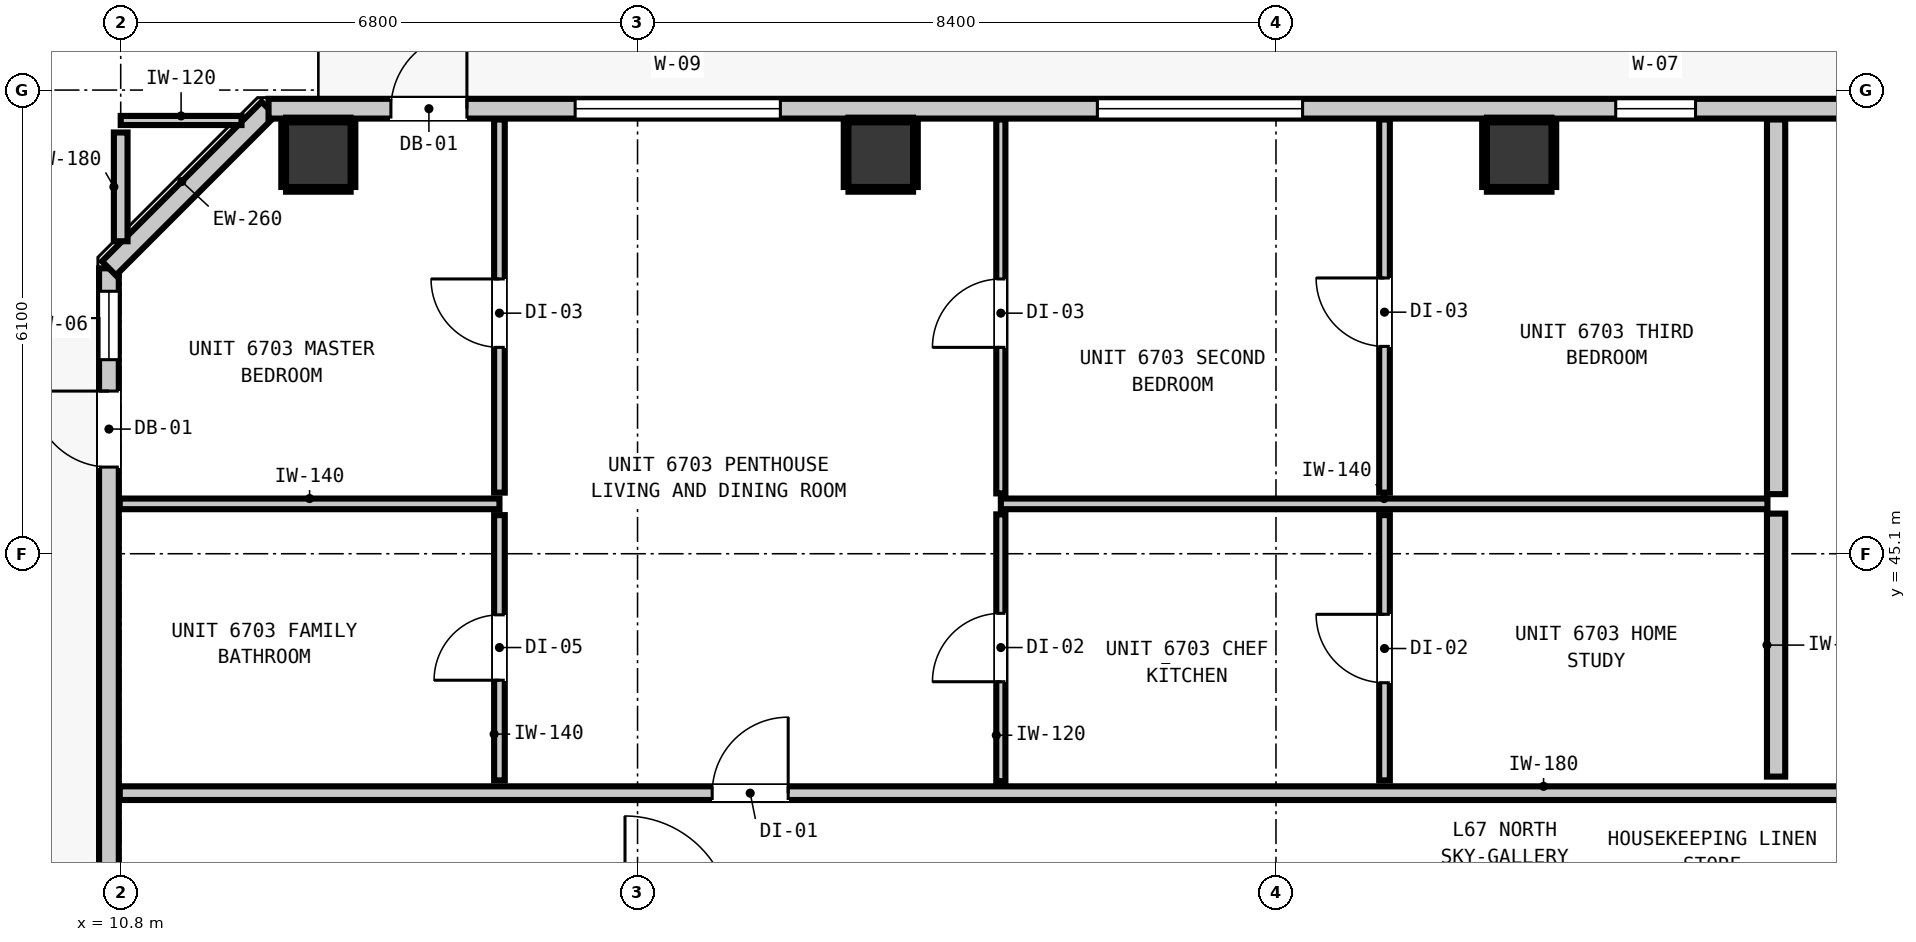
"""IFC4 building model, lengths in metres.
Left out: names, types, materials, properties, quantities, classifications, styles, units other than length and angle.
Written with IfcOpenShell. Run it as: python <this file> out.ifc"""

import sys

from ifc_helpers import new_model, si_unit, direction, frame, frame_2d, origin, origin_2d, place, context, subcontext, project, spatial, rectangle, extrude, element, fill, save


model = new_model("IFC4")
c1 = context("Model", 3, precision=1e-05, world=origin(), true_north=direction((0.0, 1.0)))
c2 = subcontext(c1, "Body", "Model", "MODEL_VIEW")
j1 = project(units=[si_unit("LENGTHUNIT", "METRE"), si_unit("PLANEANGLEUNIT", "RADIAN")], contexts=[c1])
p1 = place(None, origin())
s1 = spatial("IfcSite", under=j1, at=p1, CompositionType="ELEMENT")
p2 = place(p1, origin())
s2 = spatial("IfcBuilding", under=s1, at=p2, CompositionType="ELEMENT")
p3 = place(p2, frame((0.0, 0.0, 231.28)))
s3 = spatial("IfcBuildingStorey", under=s2, at=p3, CompositionType="ELEMENT", Elevation=231.28)
for number, where, z_axis, x_axis in (
    (1, (13.4, 50.35, -0.2), (0.0, 0.0, 1.0), (1.0, 0.0, 0.0)),
    (2, (20.8, 50.35, -0.2), (0.0, 0.0, 1.0), (1.0, 0.0, 0.0)),
    (3, (29.2, 50.35, -0.2), (0.0, 0.0, 1.0), (1.0, 0.0, 0.0)),
):
    element("IfcColumn", number, at=place(p3, frame(where, z_axis=z_axis, x_axis=x_axis)), inside=s3, PredefinedType="COLUMN", context=c2, shape_type="SweptSolid", body=[
        extrude(rectangle(XDim=0.85, YDim=0.85, at=origin_2d()), origin(), (0.0, 0.0, 1.0), 3.52),
    ])
p4 = place(p3, frame((10.645, 18.545, 0.0), z_axis=(0.0, 0.0, 1.0), x_axis=(0.0, 1.0, 0.0)))
e4 = element("IfcWall", 4, at=p4, inside=s3, PredefinedType="STANDARD", context=c2, shape_type="SweptSolid", body=[
    extrude(rectangle(XDim=30.31, YDim=0.26, at=frame_2d((15.155, 0.0))), origin(), (0.0, 0.0, 1.0), 3.1),
])
p5 = place(p4, frame((27.695, 0.0, 0.0)))
e5 = element("IfcOpeningElement", 5, at=p5, cuts=e4, PredefinedType="OPENING", context=c2, shape_type="SweptSolid", body=[
    extrude(rectangle(XDim=1.0, YDim=2.15, at=frame_2d((0.5, 1.075))), frame((0.0, 0.14, 0.0), z_axis=(0.0, -1.0, 0.0), x_axis=(1.0, 0.0, 0.0)), (0.0, 0.0, 1.0), 0.28),
])
p6 = place(p4, frame((29.108, 0.0, 0.85)))
e6 = element("IfcOpeningElement", 6, at=p6, cuts=e4, PredefinedType="OPENING", context=c2, shape_type="SweptSolid", body=[
    extrude(rectangle(XDim=0.9, YDim=1.5, at=frame_2d((0.45, 0.75))), frame((0.0, 0.14, 0.0), z_axis=(0.0, -1.0, 0.0), x_axis=(1.0, 0.0, 0.0)), (0.0, 0.0, 1.0), 0.28),
])
p7 = place(p3, frame((10.645, 48.855, 0.0), z_axis=(0.0, 0.0, 1.0), x_axis=(0.707106781187, 0.707106781187, 0.0)))
e7 = element("IfcWall", 7, at=p7, inside=s3, PredefinedType="STANDARD", context=c2, shape_type="SweptSolid", body=[
    extrude(rectangle(XDim=2.97, YDim=0.26, at=frame_2d((1.485, 0.0))), origin(), (0.0, 0.0, 1.0), 3.1),
])
p8 = place(p3, frame((12.745, 50.955, 0.0), z_axis=(0.0, 0.0, 1.0), x_axis=(1.0, 0.0, 0.0)))
e8 = element("IfcWall", 8, at=p8, inside=s3, PredefinedType="STANDARD", context=c2, shape_type="SweptSolid", body=[
    extrude(rectangle(XDim=32.71, YDim=0.26, at=frame_2d((16.355, 0.0))), origin(), (0.0, 0.0, 1.0), 3.1),
])
p9 = place(p8, frame((1.61, 0.0, 0.0)))
e9 = element("IfcOpeningElement", 9, at=p9, cuts=e8, PredefinedType="OPENING", context=c2, shape_type="SweptSolid", body=[
    extrude(rectangle(XDim=1.0, YDim=2.15, at=frame_2d((0.5, 1.075))), frame((0.0, 0.14, 0.0), z_axis=(0.0, -1.0, 0.0), x_axis=(1.0, 0.0, 0.0)), (0.0, 0.0, 1.0), 0.28),
])
p10 = place(p8, frame((4.034, 0.0, 0.85)))
e10 = element("IfcOpeningElement", 10, at=p10, cuts=e8, PredefinedType="OPENING", context=c2, shape_type="SweptSolid", body=[
    extrude(rectangle(XDim=2.7, YDim=2.0, at=frame_2d((1.35, 1.0))), frame((0.0, 0.14, 0.0), z_axis=(0.0, -1.0, 0.0), x_axis=(1.0, 0.0, 0.0)), (0.0, 0.0, 1.0), 0.28),
])
p11 = place(p8, frame((10.905, 0.0, 0.85)))
e11 = element("IfcOpeningElement", 11, at=p11, cuts=e8, PredefinedType="OPENING", context=c2, shape_type="SweptSolid", body=[
    extrude(rectangle(XDim=2.7, YDim=2.0, at=frame_2d((1.35, 1.0))), frame((0.0, 0.14, 0.0), z_axis=(0.0, -1.0, 0.0), x_axis=(1.0, 0.0, 0.0)), (0.0, 0.0, 1.0), 0.28),
])
p12 = place(p8, frame((17.725, 0.0, 0.85)))
e12 = element("IfcOpeningElement", 12, at=p12, cuts=e8, PredefinedType="OPENING", context=c2, shape_type="SweptSolid", body=[
    extrude(rectangle(XDim=1.05, YDim=1.65, at=frame_2d((0.525, 0.825))), frame((0.0, 0.14, 0.0), z_axis=(0.0, -1.0, 0.0), x_axis=(1.0, 0.0, 0.0)), (0.0, 0.0, 1.0), 0.28),
])
p13 = place(p8, frame((27.05, 0.0, 0.85)))
e13 = element("IfcOpeningElement", 13, at=p13, cuts=e8, PredefinedType="OPENING", context=c2, shape_type="SweptSolid", body=[
    extrude(rectangle(XDim=2.7, YDim=2.0, at=frame_2d((1.35, 1.0))), frame((0.0, 0.14, 0.0), z_axis=(0.0, -1.0, 0.0), x_axis=(1.0, 0.0, 0.0)), (0.0, 0.0, 1.0), 0.28),
])
p14 = place(p3, frame((10.787, 41.95, 0.0), z_axis=(0.0, 0.0, 1.0), x_axis=(1.0, 0.0, 0.0)))
e14 = element("IfcWall", 14, at=p14, inside=s3, PredefinedType="PARTITIONING", context=c2, shape_type="SweptSolid", body=[
    extrude(rectangle(XDim=36.626, YDim=0.18, at=frame_2d((18.313, 0.0))), origin(), (0.0, 0.0, 1.0), 3.1),
])
p15 = place(p14, frame((7.795, 0.0, 0.0)))
e15 = element("IfcOpeningElement", 15, at=p15, cuts=e14, PredefinedType="OPENING", context=c2, shape_type="SweptSolid", body=[
    extrude(rectangle(XDim=1.0, YDim=2.15, at=frame_2d((0.5, 1.075))), frame((0.0, 0.1, 0.0), z_axis=(0.0, -1.0, 0.0), x_axis=(1.0, 0.0, 0.0)), (0.0, 0.0, 1.0), 0.2),
])
p16 = place(p14, frame((28.672, 0.0, 0.0)))
e16 = element("IfcOpeningElement", 16, at=p16, cuts=e14, PredefinedType="OPENING", context=c2, shape_type="SweptSolid", body=[
    extrude(rectangle(XDim=0.9, YDim=2.1, at=frame_2d((0.45, 1.05))), frame((0.0, 0.1, 0.0), z_axis=(0.0, -1.0, 0.0), x_axis=(1.0, 0.0, 0.0)), (0.0, 0.0, 1.0), 0.2),
])
p17 = place(p3, frame((10.787, 45.756, 0.0), z_axis=(0.0, 0.0, 1.0), x_axis=(1.0, 0.0, 0.0)))
e17 = element("IfcWall", 17, at=p17, inside=s3, PredefinedType="PARTITIONING", context=c2, shape_type="SweptSolid", body=[
    extrude(rectangle(XDim=4.996, YDim=0.14, at=frame_2d((2.498, 0.0))), origin(), (0.0, 0.0, 1.0), 3.1),
])
p18 = place(p3, frame((22.38, 45.756, 0.0), z_axis=(0.0, 0.0, 1.0), x_axis=(1.0, 0.0, 0.0)))
e18 = element("IfcWall", 18, at=p18, inside=s3, PredefinedType="PARTITIONING", context=c2, shape_type="SweptSolid", body=[
    extrude(rectangle(XDim=10.086, YDim=0.14, at=frame_2d((5.043, 0.0))), origin(), (0.0, 0.0, 1.0), 3.1),
])
p19 = place(p3, frame((10.8, 50.8, 0.0), z_axis=(0.0, 0.0, 1.0), x_axis=(1.0, 0.0, 0.0)))
e19 = element("IfcWall", 19, at=p19, inside=s3, PredefinedType="PARTITIONING", context=c2, shape_type="SweptSolid", body=[
    extrude(rectangle(XDim=1.589, YDim=0.12, at=frame_2d((0.794, 0.0))), origin(), (0.0, 0.0, 1.0), 3.1),
])
p20 = place(p3, frame((32.58, 42.168, 0.0), z_axis=(0.0, 0.0, 1.0), x_axis=(0.0, 1.0, 0.0)))
e20 = element("IfcWall", 20, at=p20, inside=s3, PredefinedType="PARTITIONING", context=c2, shape_type="SweptSolid", body=[
    extrude(rectangle(XDim=3.46, YDim=0.24, at=frame_2d((1.73, 0.0))), origin(), (0.0, 0.0, 1.0), 3.1),
])
p21 = place(p3, frame((32.58, 45.884, 0.0), z_axis=(0.0, 0.0, 1.0), x_axis=(0.0, 1.0, 0.0)))
e21 = element("IfcWall", 21, at=p21, inside=s3, PredefinedType="PARTITIONING", context=c2, shape_type="SweptSolid", body=[
    extrude(rectangle(XDim=4.929, YDim=0.24, at=frame_2d((2.464, 0.0))), origin(), (0.0, 0.0, 1.0), 3.1),
])
p22 = place(p3, frame((10.8, 49.211, 0.0), z_axis=(0.0, 0.0, 1.0), x_axis=(0.0, 1.0, 0.0)))
e22 = element("IfcWall", 22, at=p22, inside=s3, PredefinedType="PARTITIONING", context=c2, shape_type="SweptSolid", body=[
    extrude(rectangle(XDim=1.431, YDim=0.18, at=frame_2d((0.716, 0.0))), origin(), (0.0, 0.0, 1.0), 3.1),
])
p23 = place(p3, frame((15.783, 42.118, 0.0), z_axis=(0.0, 0.0, 1.0), x_axis=(0.0, 1.0, 0.0)))
e23 = element("IfcWall", 23, at=p23, inside=s3, PredefinedType="PARTITIONING", context=c2, shape_type="SweptSolid", body=[
    extrude(rectangle(XDim=3.49, YDim=0.14, at=frame_2d((1.745, 0.0))), origin(), (0.0, 0.0, 1.0), 3.1),
])
p24 = place(p23, frame((1.318, 0.0, 0.0)))
e24 = element("IfcOpeningElement", 24, at=p24, cuts=e23, PredefinedType="OPENING", context=c2, shape_type="SweptSolid", body=[
    extrude(rectangle(XDim=0.86, YDim=2.02, at=frame_2d((0.43, 1.01))), frame((0.0, 0.08, 0.0), z_axis=(0.0, -1.0, 0.0), x_axis=(1.0, 0.0, 0.0)), (0.0, 0.0, 1.0), 0.16),
])
p25 = place(p3, frame((15.783, 45.904, 0.0), z_axis=(0.0, 0.0, 1.0), x_axis=(0.0, 1.0, 0.0)))
e25 = element("IfcWall", 25, at=p25, inside=s3, PredefinedType="PARTITIONING", context=c2, shape_type="SweptSolid", body=[
    extrude(rectangle(XDim=4.909, YDim=0.14, at=frame_2d((2.455, 0.0))), origin(), (0.0, 0.0, 1.0), 3.1),
])
p26 = place(p25, frame((1.911, 0.0, 0.0)))
e26 = element("IfcOpeningElement", 26, at=p26, cuts=e25, PredefinedType="OPENING", context=c2, shape_type="SweptSolid", body=[
    extrude(rectangle(XDim=0.9, YDim=2.1, at=frame_2d((0.45, 1.05))), frame((0.0, 0.08, 0.0), z_axis=(0.0, -1.0, 0.0), x_axis=(1.0, 0.0, 0.0)), (0.0, 0.0, 1.0), 0.16),
])
p27 = place(p3, frame((27.428, 42.118, 0.0), z_axis=(0.0, 0.0, 1.0), x_axis=(0.0, 1.0, 0.0)))
e27 = element("IfcWall", 27, at=p27, inside=s3, PredefinedType="PARTITIONING", context=c2, shape_type="SweptSolid", body=[
    extrude(rectangle(XDim=3.49, YDim=0.14, at=frame_2d((1.745, 0.0))), origin(), (0.0, 0.0, 1.0), 3.1),
])
p28 = place(p27, frame((1.285, 0.0, 0.0)))
e28 = element("IfcOpeningElement", 28, at=p28, cuts=e27, PredefinedType="OPENING", context=c2, shape_type="SweptSolid", body=[
    extrude(rectangle(XDim=0.9, YDim=2.1, at=frame_2d((0.45, 1.05))), frame((0.0, 0.08, 0.0), z_axis=(0.0, -1.0, 0.0), x_axis=(1.0, 0.0, 0.0)), (0.0, 0.0, 1.0), 0.16),
])
p29 = place(p3, frame((27.428, 45.904, 0.0), z_axis=(0.0, 0.0, 1.0), x_axis=(0.0, 1.0, 0.0)))
e29 = element("IfcWall", 29, at=p29, inside=s3, PredefinedType="PARTITIONING", context=c2, shape_type="SweptSolid", body=[
    extrude(rectangle(XDim=4.909, YDim=0.14, at=frame_2d((2.455, 0.0))), origin(), (0.0, 0.0, 1.0), 3.1),
])
p30 = place(p29, frame((1.924, 0.0, 0.0)))
e30 = element("IfcOpeningElement", 30, at=p30, cuts=e29, PredefinedType="OPENING", context=c2, shape_type="SweptSolid", body=[
    extrude(rectangle(XDim=0.9, YDim=2.1, at=frame_2d((0.45, 1.05))), frame((0.0, 0.08, 0.0), z_axis=(0.0, -1.0, 0.0), x_axis=(1.0, 0.0, 0.0)), (0.0, 0.0, 1.0), 0.16),
])
p31 = place(p3, frame((22.38, 42.108, 0.0), z_axis=(0.0, 0.0, 1.0), x_axis=(0.0, 1.0, 0.0)))
e31 = element("IfcWall", 31, at=p31, inside=s3, PredefinedType="PARTITIONING", context=c2, shape_type="SweptSolid", body=[
    extrude(rectangle(XDim=3.51, YDim=0.12, at=frame_2d((1.755, 0.0))), origin(), (0.0, 0.0, 1.0), 3.1),
])
p32 = place(p31, frame((1.308, 0.0, 0.0)))
e32 = element("IfcOpeningElement", 32, at=p32, cuts=e31, PredefinedType="OPENING", context=c2, shape_type="SweptSolid", body=[
    extrude(rectangle(XDim=0.9, YDim=2.1, at=frame_2d((0.45, 1.05))), frame((0.0, 0.07, 0.0), z_axis=(0.0, -1.0, 0.0), x_axis=(1.0, 0.0, 0.0)), (0.0, 0.0, 1.0), 0.14),
])
p33 = place(p3, frame((22.38, 45.894, 0.0), z_axis=(0.0, 0.0, 1.0), x_axis=(0.0, 1.0, 0.0)))
e33 = element("IfcWall", 33, at=p33, inside=s3, PredefinedType="PARTITIONING", context=c2, shape_type="SweptSolid", body=[
    extrude(rectangle(XDim=4.919, YDim=0.12, at=frame_2d((2.459, 0.0))), origin(), (0.0, 0.0, 1.0), 3.1),
])
p34 = place(p33, frame((1.921, 0.0, 0.0)))
e34 = element("IfcOpeningElement", 34, at=p34, cuts=e33, PredefinedType="OPENING", context=c2, shape_type="SweptSolid", body=[
    extrude(rectangle(XDim=0.9, YDim=2.1, at=frame_2d((0.45, 1.05))), frame((0.0, 0.07, 0.0), z_axis=(0.0, -1.0, 0.0), x_axis=(1.0, 0.0, 0.0)), (0.0, 0.0, 1.0), 0.14),
])
for number, where, z_axis, x_axis in (
    (35, (12.975, 49.893, 0.0), (0.0, 0.0, 1.0), (1.0, 0.0, 0.0)),
    (36, (12.975, 50.807, 0.0), (0.0, 0.0, 1.0), (1.0, 0.0, 0.0)),
    (37, (12.943, 49.925, 0.0), (0.0, 0.0, 1.0), (0.0, 1.0, 0.0)),
    (38, (13.857, 49.925, 0.0), (0.0, 0.0, 1.0), (0.0, 1.0, 0.0)),
):
    element("IfcWall", number, at=place(p3, frame(where, z_axis=z_axis, x_axis=x_axis)), inside=s3, PredefinedType="PARTITIONING", context=c2, shape_type="SweptSolid", body=[
        extrude(rectangle(XDim=0.85, YDim=0.06, at=frame_2d((0.425, 0.0))), origin(), (0.0, 0.0, 1.0), 1.45),
    ])
for number, where, z_axis, x_axis in (
    (39, (20.375, 49.893, 0.0), (0.0, 0.0, 1.0), (1.0, 0.0, 0.0)),
    (40, (20.375, 50.807, 0.0), (0.0, 0.0, 1.0), (1.0, 0.0, 0.0)),
):
    element("IfcWall", number, at=place(p3, frame(where, z_axis=z_axis, x_axis=x_axis)), inside=s3, PredefinedType="PARTITIONING", context=c2, shape_type="SweptSolid", body=[
        extrude(rectangle(XDim=0.85, YDim=0.06, at=frame_2d((0.425, 0.0))), origin(), (0.0, 0.0, 1.0), 1.45),
    ])
for number, where, z_axis, x_axis in (
    (41, (20.343, 49.925, 0.0), (0.0, 0.0, 1.0), (0.0, 1.0, 0.0)),
    (42, (21.257, 49.925, 0.0), (0.0, 0.0, 1.0), (0.0, 1.0, 0.0)),
):
    element("IfcWall", number, at=place(p3, frame(where, z_axis=z_axis, x_axis=x_axis)), inside=s3, PredefinedType="PARTITIONING", context=c2, shape_type="SweptSolid", body=[
        extrude(rectangle(XDim=0.85, YDim=0.06, at=frame_2d((0.425, 0.0))), origin(), (0.0, 0.0, 1.0), 1.45),
    ])
for number, where, z_axis, x_axis in (
    (43, (28.775, 49.893, 0.0), (0.0, 0.0, 1.0), (1.0, 0.0, 0.0)),
    (44, (28.775, 50.807, 0.0), (0.0, 0.0, 1.0), (1.0, 0.0, 0.0)),
):
    element("IfcWall", number, at=place(p3, frame(where, z_axis=z_axis, x_axis=x_axis)), inside=s3, PredefinedType="PARTITIONING", context=c2, shape_type="SweptSolid", body=[
        extrude(rectangle(XDim=0.85, YDim=0.06, at=frame_2d((0.425, 0.0))), origin(), (0.0, 0.0, 1.0), 1.45),
    ])
for number, where, z_axis, x_axis in (
    (45, (28.743, 49.925, 0.0), (0.0, 0.0, 1.0), (0.0, 1.0, 0.0)),
    (46, (29.657, 49.925, 0.0), (0.0, 0.0, 1.0), (0.0, 1.0, 0.0)),
):
    element("IfcWall", number, at=place(p3, frame(where, z_axis=z_axis, x_axis=x_axis)), inside=s3, PredefinedType="PARTITIONING", context=c2, shape_type="SweptSolid", body=[
        extrude(rectangle(XDim=0.85, YDim=0.06, at=frame_2d((0.425, 0.0))), origin(), (0.0, 0.0, 1.0), 1.45),
    ])
p35 = place(p9, origin())
e47 = element("IfcDoor", 47, at=p35, inside=s3, OperationType="SINGLE_SWING_RIGHT", PredefinedType="DOOR", context=c2, shape_type="SweptSolid", body=[
    extrude(rectangle(XDim=1.0, YDim=2.15, at=frame_2d((0.5, 1.075))), frame((0.0, 0.025, 0.0), z_axis=(0.0, -1.0, 0.0), x_axis=(1.0, 0.0, 0.0)), (0.0, 0.0, 1.0), 0.05),
])
fill(e9, e47)
p36 = place(p5, origin())
e48 = element("IfcDoor", 48, at=p36, inside=s3, OperationType="SINGLE_SWING_RIGHT", PredefinedType="DOOR", context=c2, shape_type="SweptSolid", body=[
    extrude(rectangle(XDim=1.0, YDim=2.15, at=frame_2d((0.5, 1.075))), frame((0.0, 0.025, 0.0), z_axis=(0.0, -1.0, 0.0), x_axis=(1.0, 0.0, 0.0)), (0.0, 0.0, 1.0), 0.05),
])
fill(e5, e48)
p37 = place(p6, origin())
e49 = element("IfcWindow", 49, at=p37, inside=s3, PartitioningType="SINGLE_PANEL", PredefinedType="WINDOW", context=c2, shape_type="SweptSolid", body=[
    extrude(rectangle(XDim=0.9, YDim=1.5, at=frame_2d((0.45, 0.75))), frame((0.0, 0.03, 0.0), z_axis=(0.0, -1.0, 0.0), x_axis=(1.0, 0.0, 0.0)), (0.0, 0.0, 1.0), 0.06),
])
fill(e6, e49)
p38 = place(p10, origin())
e50 = element("IfcWindow", 50, at=p38, inside=s3, PartitioningType="SINGLE_PANEL", PredefinedType="WINDOW", context=c2, shape_type="SweptSolid", body=[
    extrude(rectangle(XDim=2.7, YDim=2.0, at=frame_2d((1.35, 1.0))), frame((0.0, 0.03, 0.0), z_axis=(0.0, -1.0, 0.0), x_axis=(1.0, 0.0, 0.0)), (0.0, 0.0, 1.0), 0.06),
])
fill(e10, e50)
p39 = place(p11, origin())
e51 = element("IfcWindow", 51, at=p39, inside=s3, PartitioningType="SINGLE_PANEL", PredefinedType="WINDOW", context=c2, shape_type="SweptSolid", body=[
    extrude(rectangle(XDim=2.7, YDim=2.0, at=frame_2d((1.35, 1.0))), frame((0.0, 0.03, 0.0), z_axis=(0.0, -1.0, 0.0), x_axis=(1.0, 0.0, 0.0)), (0.0, 0.0, 1.0), 0.06),
])
fill(e11, e51)
p40 = place(p12, origin())
e52 = element("IfcWindow", 52, at=p40, inside=s3, PartitioningType="SINGLE_PANEL", PredefinedType="WINDOW", context=c2, shape_type="SweptSolid", body=[
    extrude(rectangle(XDim=1.05, YDim=1.65, at=frame_2d((0.525, 0.825))), frame((0.0, 0.03, 0.0), z_axis=(0.0, -1.0, 0.0), x_axis=(1.0, 0.0, 0.0)), (0.0, 0.0, 1.0), 0.06),
])
fill(e12, e52)
p41 = place(p15, origin())
e53 = element("IfcDoor", 53, at=p41, inside=s3, OperationType="SINGLE_SWING_RIGHT", PredefinedType="DOOR", context=c2, shape_type="SweptSolid", body=[
    extrude(rectangle(XDim=1.0, YDim=2.15, at=frame_2d((0.5, 1.075))), frame((0.0, 0.025, 0.0), z_axis=(0.0, -1.0, 0.0), x_axis=(1.0, 0.0, 0.0)), (0.0, 0.0, 1.0), 0.05),
])
fill(e15, e53)
p42 = place(p24, origin())
e54 = element("IfcDoor", 54, at=p42, inside=s3, OperationType="SINGLE_SWING_LEFT", PredefinedType="DOOR", context=c2, shape_type="SweptSolid", body=[
    extrude(rectangle(XDim=0.86, YDim=2.02, at=frame_2d((0.43, 1.01))), frame((0.0, 0.025, 0.0), z_axis=(0.0, -1.0, 0.0), x_axis=(1.0, 0.0, 0.0)), (0.0, 0.0, 1.0), 0.05),
])
fill(e24, e54)
p43 = place(p26, origin())
e55 = element("IfcDoor", 55, at=p43, inside=s3, OperationType="SINGLE_SWING_RIGHT", PredefinedType="DOOR", context=c2, shape_type="SweptSolid", body=[
    extrude(rectangle(XDim=0.9, YDim=2.1, at=frame_2d((0.45, 1.05))), frame((0.0, 0.025, 0.0), z_axis=(0.0, -1.0, 0.0), x_axis=(1.0, 0.0, 0.0)), (0.0, 0.0, 1.0), 0.05),
])
fill(e26, e55)
p44 = place(p32, origin())
e56 = element("IfcDoor", 56, at=p44, inside=s3, OperationType="SINGLE_SWING_LEFT", PredefinedType="DOOR", context=c2, shape_type="SweptSolid", body=[
    extrude(rectangle(XDim=0.9, YDim=2.1, at=frame_2d((0.45, 1.05))), frame((0.0, 0.025, 0.0), z_axis=(0.0, -1.0, 0.0), x_axis=(1.0, 0.0, 0.0)), (0.0, 0.0, 1.0), 0.05),
])
fill(e32, e56)
p45 = place(p28, origin())
e57 = element("IfcDoor", 57, at=p45, inside=s3, OperationType="SINGLE_SWING_RIGHT", PredefinedType="DOOR", context=c2, shape_type="SweptSolid", body=[
    extrude(rectangle(XDim=0.9, YDim=2.1, at=frame_2d((0.45, 1.05))), frame((0.0, 0.025, 0.0), z_axis=(0.0, -1.0, 0.0), x_axis=(1.0, 0.0, 0.0)), (0.0, 0.0, 1.0), 0.05),
])
fill(e28, e57)
p46 = place(p34, origin())
e58 = element("IfcDoor", 58, at=p46, inside=s3, OperationType="SINGLE_SWING_LEFT", PredefinedType="DOOR", context=c2, shape_type="SweptSolid", body=[
    extrude(rectangle(XDim=0.9, YDim=2.1, at=frame_2d((0.45, 1.05))), frame((0.0, 0.025, 0.0), z_axis=(0.0, -1.0, 0.0), x_axis=(1.0, 0.0, 0.0)), (0.0, 0.0, 1.0), 0.05),
])
fill(e34, e58)
p47 = place(p30, origin())
e59 = element("IfcDoor", 59, at=p47, inside=s3, OperationType="SINGLE_SWING_RIGHT", PredefinedType="DOOR", context=c2, shape_type="SweptSolid", body=[
    extrude(rectangle(XDim=0.9, YDim=2.1, at=frame_2d((0.45, 1.05))), frame((0.0, 0.025, 0.0), z_axis=(0.0, -1.0, 0.0), x_axis=(1.0, 0.0, 0.0)), (0.0, 0.0, 1.0), 0.05),
])
fill(e30, e59)
save(model, sys.argv[1])
